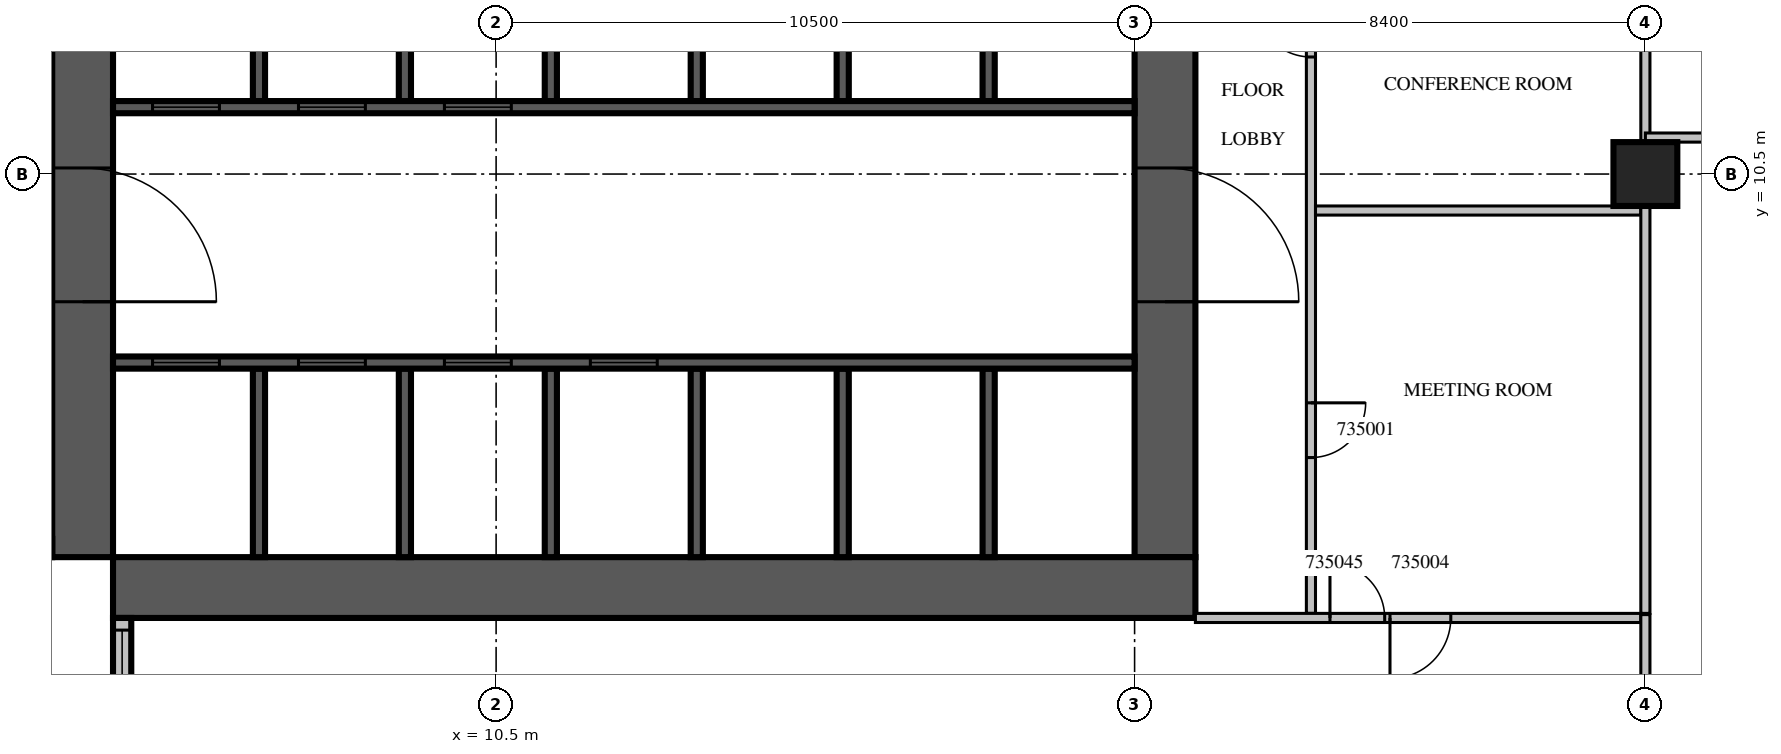
"""IFC4 building model, lengths in metres.
Left out: names, types, materials, properties, quantities, classifications, styles, units other than length and angle.
Written with IfcOpenShell. Run it as: python <this file> out.ifc"""

import sys

from ifc_helpers import new_model, si_unit, direction, frame, frame_2d, origin, origin_2d, place, context, subcontext, project, spatial, rectangle, extrude, source, transform, mapped, element, fill, save


model = new_model("IFC4")
c1 = context("Model", 3, precision=1e-05, world=origin(), true_north=direction((0.0, 1.0)))
c2 = subcontext(c1, "Body", "Model", "MODEL_VIEW")
j1 = project(units=[si_unit("LENGTHUNIT", "METRE"), si_unit("PLANEANGLEUNIT", "RADIAN")], contexts=[c1])
p1 = place(None, origin())
s1 = spatial("IfcSite", under=j1, at=p1, CompositionType="ELEMENT")
p2 = place(p1, origin())
s2 = spatial("IfcBuilding", under=s1, at=p2, CompositionType="ELEMENT")
p3 = place(p2, frame((0.0, 0.0, 158.1)))
s3 = spatial("IfcBuildingStorey", under=s2, at=p3, CompositionType="ELEMENT", Elevation=158.1)
m1 = source(origin(), c2, "Body", "SweptSolid", [
    extrude(rectangle(XDim=1.05, YDim=1.05, at=origin_2d()), origin(), (0.0, 0.0, 1.0), 4.2),
])
p4 = place(p3, frame((29.4, 10.5, 0.0), z_axis=(0.0, 0.0, 1.0), x_axis=(1.0, 0.0, 0.0)))
e1 = element("IfcColumn", 1, at=p4, inside=s3, PredefinedType="COLUMN", context=c2, shape_type="MappedRepresentation", body=[
    mapped(m1, transform((0.0, 0.0, 0.0), scale=1.0)),
])
m2 = source(origin(), c2, "Body", "SweptSolid", [
    extrude(rectangle(XDim=17.8, YDim=1.0, at=frame_2d((8.9, 0.0))), origin(), (0.0, 0.0, 1.0), 4.2),
])
p5 = place(p3, frame((3.7, 4.2, 0.0), z_axis=(0.0, 0.0, 1.0), x_axis=(0.0, 1.0, 0.0)))
e2 = element("IfcWall", 2, at=p5, inside=s3, PredefinedType="SHEAR", context=c2, shape_type="MappedRepresentation", body=[
    mapped(m2, transform((0.0, 0.0, 0.0), scale=1.0)),
])
m3 = source(origin(), c2, "Body", "SweptSolid", [
    extrude(rectangle(XDim=2.2, YDim=2.1, at=frame_2d((1.1, 1.05))), frame((0.0, 0.51, 0.0), z_axis=(0.0, -1.0, 0.0), x_axis=(1.0, 0.0, 0.0)), (0.0, 0.0, 1.0), 1.02),
])
p6 = place(p5, frame((4.2, 0.0, 0.0)))
e3 = element("IfcOpeningElement", 3, at=p6, cuts=e2, PredefinedType="OPENING", context=c2, shape_type="MappedRepresentation", body=[
    mapped(m3, transform((0.0, 0.0, 0.0), scale=1.0)),
])
m4 = source(origin(), c2, "Body", "SweptSolid", [
    extrude(rectangle(XDim=0.9, YDim=2.1, at=frame_2d((0.45, 1.05))), frame((0.0, 0.51, 0.0), z_axis=(0.0, -1.0, 0.0), x_axis=(1.0, 0.0, 0.0)), (0.0, 0.0, 1.0), 1.02),
])
p7 = place(p5, frame((10.95, 0.0, 0.0)))
e4 = element("IfcOpeningElement", 4, at=p7, cuts=e2, PredefinedType="OPENING", context=c2, shape_type="MappedRepresentation", body=[
    mapped(m4, transform((0.0, 0.0, 0.0), scale=1.0)),
])
m5 = source(origin(), c2, "Body", "SweptSolid", [
    extrude(rectangle(XDim=16.8, YDim=1.0, at=frame_2d((8.4, 0.0))), origin(), (0.0, 0.0, 1.0), 4.2),
])
p8 = place(p3, frame((21.5, 4.2, 0.0), z_axis=(0.0, 0.0, 1.0), x_axis=(0.0, 1.0, 0.0)))
e5 = element("IfcWall", 5, at=p8, inside=s3, PredefinedType="SHEAR", context=c2, shape_type="MappedRepresentation", body=[
    mapped(m5, transform((0.0, 0.0, 0.0), scale=1.0)),
])
p9 = place(p8, frame((4.2, 0.0, 0.0)))
e6 = element("IfcOpeningElement", 6, at=p9, cuts=e5, PredefinedType="OPENING", context=c2, shape_type="MappedRepresentation", body=[
    mapped(m3, transform((0.0, 0.0, 0.0), scale=1.0)),
])
m6 = source(origin(), c2, "Body", "SweptSolid", [
    extrude(rectangle(XDim=1.2, YDim=2.1, at=frame_2d((0.6, 1.05))), frame((0.0, 0.51, 0.0), z_axis=(0.0, -1.0, 0.0), x_axis=(1.0, 0.0, 0.0)), (0.0, 0.0, 1.0), 1.02),
])
p10 = place(p8, frame((14.7, 0.0, 0.0)))
e7 = element("IfcOpeningElement", 7, at=p10, cuts=e5, PredefinedType="OPENING", context=c2, shape_type="MappedRepresentation", body=[
    mapped(m6, transform((0.0, 0.0, 0.0), scale=1.0)),
])
p11 = place(p3, frame((4.2, 3.7, 0.0), z_axis=(0.0, 0.0, 1.0), x_axis=(1.0, 0.0, 0.0)))
e8 = element("IfcWall", 8, at=p11, inside=s3, PredefinedType="SHEAR", context=c2, shape_type="MappedRepresentation", body=[
    mapped(m2, transform((0.0, 0.0, 0.0), scale=1.0)),
])
m7 = source(origin(), c2, "Body", "SweptSolid", [
    extrude(rectangle(XDim=3.2, YDim=0.3, at=frame_2d((1.6, 0.0))), origin(), (0.0, 0.0, 1.0), 3.8),
])
p12 = place(p3, frame((4.35, 3.2, 0.0), z_axis=(0.0, 0.0, 1.0), x_axis=(0.0, -1.0, 0.0)))
e9 = element("IfcWall", 9, at=p12, inside=s3, PredefinedType="STANDARD", context=c2, shape_type="MappedRepresentation", body=[
    mapped(m7, transform((0.0, 0.0, 0.0), scale=1.0)),
])
m8 = source(origin(), c2, "Body", "SweptSolid", [
    extrude(rectangle(XDim=1.8, YDim=2.7, at=frame_2d((0.9, 1.35))), frame((0.0, 0.16, 0.0), z_axis=(0.0, -1.0, 0.0), x_axis=(1.0, 0.0, 0.0)), (0.0, 0.0, 1.0), 0.32),
])
p13 = place(p12, frame((0.2, 0.0, 0.6)))
e10 = element("IfcOpeningElement", 10, at=p13, cuts=e9, PredefinedType="OPENING", context=c2, shape_type="MappedRepresentation", body=[
    mapped(m8, transform((0.0, 0.0, 0.0), scale=1.0)),
])
m9 = source(origin(), c2, "Body", "SweptSolid", [
    extrude(rectangle(XDim=3.1, YDim=0.2, at=frame_2d((1.55, 0.0))), origin(), (0.0, 0.0, 1.0), 4.2),
])
for number, where, z_axis, x_axis in (
    (11, (6.6, 4.2, 0.0), (0.0, 0.0, 1.0), (0.0, 1.0, 0.0)),
    (12, (9.0, 4.2, 0.0), (0.0, 0.0, 1.0), (0.0, 1.0, 0.0)),
    (13, (11.4, 4.2, 0.0), (0.0, 0.0, 1.0), (0.0, 1.0, 0.0)),
    (14, (13.8, 4.2, 0.0), (0.0, 0.0, 1.0), (0.0, 1.0, 0.0)),
    (15, (16.2, 4.2, 0.0), (0.0, 0.0, 1.0), (0.0, 1.0, 0.0)),
    (16, (18.6, 4.2, 0.0), (0.0, 0.0, 1.0), (0.0, 1.0, 0.0)),
):
    element("IfcWall", number, at=place(p3, frame(where, z_axis=z_axis, x_axis=x_axis)), inside=s3, PredefinedType="SOLIDWALL", context=c2, shape_type="MappedRepresentation", body=[
        mapped(m9, transform((0.0, 0.0, 0.0), scale=1.0)),
    ])
m10 = source(origin(), c2, "Body", "SweptSolid", [
    extrude(rectangle(XDim=3.0, YDim=0.2, at=frame_2d((1.5, 0.0))), origin(), (0.0, 0.0, 1.0), 4.2),
])
for number, where, z_axis, x_axis in (
    (17, (6.6, 11.7, 0.0), (0.0, 0.0, 1.0), (0.0, 1.0, 0.0)),
    (18, (9.0, 11.7, 0.0), (0.0, 0.0, 1.0), (0.0, 1.0, 0.0)),
    (19, (11.4, 11.7, 0.0), (0.0, 0.0, 1.0), (0.0, 1.0, 0.0)),
    (20, (13.8, 11.7, 0.0), (0.0, 0.0, 1.0), (0.0, 1.0, 0.0)),
    (21, (16.2, 11.7, 0.0), (0.0, 0.0, 1.0), (0.0, 1.0, 0.0)),
    (22, (18.6, 11.7, 0.0), (0.0, 0.0, 1.0), (0.0, 1.0, 0.0)),
):
    element("IfcWall", number, at=place(p3, frame(where, z_axis=z_axis, x_axis=x_axis)), inside=s3, PredefinedType="SOLIDWALL", context=c2, shape_type="MappedRepresentation", body=[
        mapped(m10, transform((0.0, 0.0, 0.0), scale=1.0)),
    ])
m11 = source(origin(), c2, "Body", "SweptSolid", [
    extrude(rectangle(XDim=16.8, YDim=0.2, at=frame_2d((8.4, 0.0))), origin(), (0.0, 0.0, 1.0), 4.2),
])
p14 = place(p3, frame((4.2, 7.4, 0.0), z_axis=(0.0, 0.0, 1.0), x_axis=(1.0, 0.0, 0.0)))
e23 = element("IfcWall", 23, at=p14, inside=s3, PredefinedType="SOLIDWALL", context=c2, shape_type="MappedRepresentation", body=[
    mapped(m11, transform((0.0, 0.0, 0.0), scale=1.0)),
])
m12 = source(origin(), c2, "Body", "SweptSolid", [
    extrude(rectangle(XDim=1.1, YDim=2.1, at=frame_2d((0.55, 1.05))), frame((0.0, 0.11, 0.0), z_axis=(0.0, -1.0, 0.0), x_axis=(1.0, 0.0, 0.0)), (0.0, 0.0, 1.0), 0.22),
])
p15 = place(p14, frame((0.65, 0.0, 0.0)))
e24 = element("IfcOpeningElement", 24, at=p15, cuts=e23, PredefinedType="OPENING", context=c2, shape_type="MappedRepresentation", body=[
    mapped(m12, transform((0.0, 0.0, 0.0), scale=1.0)),
])
p16 = place(p14, frame((3.05, 0.0, 0.0)))
e25 = element("IfcOpeningElement", 25, at=p16, cuts=e23, PredefinedType="OPENING", context=c2, shape_type="MappedRepresentation", body=[
    mapped(m12, transform((0.0, 0.0, 0.0), scale=1.0)),
])
p17 = place(p14, frame((5.45, 0.0, 0.0)))
e26 = element("IfcOpeningElement", 26, at=p17, cuts=e23, PredefinedType="OPENING", context=c2, shape_type="MappedRepresentation", body=[
    mapped(m12, transform((0.0, 0.0, 0.0), scale=1.0)),
])
p18 = place(p14, frame((7.85, 0.0, 0.0)))
e27 = element("IfcOpeningElement", 27, at=p18, cuts=e23, PredefinedType="OPENING", context=c2, shape_type="MappedRepresentation", body=[
    mapped(m12, transform((0.0, 0.0, 0.0), scale=1.0)),
])
p19 = place(p3, frame((4.2, 11.6, 0.0), z_axis=(0.0, 0.0, 1.0), x_axis=(1.0, 0.0, 0.0)))
e28 = element("IfcWall", 28, at=p19, inside=s3, PredefinedType="SOLIDWALL", context=c2, shape_type="MappedRepresentation", body=[
    mapped(m11, transform((0.0, 0.0, 0.0), scale=1.0)),
])
p20 = place(p19, frame((0.65, 0.0, 0.0)))
e29 = element("IfcOpeningElement", 29, at=p20, cuts=e28, PredefinedType="OPENING", context=c2, shape_type="MappedRepresentation", body=[
    mapped(m12, transform((0.0, 0.0, 0.0), scale=1.0)),
])
p21 = place(p19, frame((3.05, 0.0, 0.0)))
e30 = element("IfcOpeningElement", 30, at=p21, cuts=e28, PredefinedType="OPENING", context=c2, shape_type="MappedRepresentation", body=[
    mapped(m12, transform((0.0, 0.0, 0.0), scale=1.0)),
])
p22 = place(p19, frame((5.45, 0.0, 0.0)))
e31 = element("IfcOpeningElement", 31, at=p22, cuts=e28, PredefinedType="OPENING", context=c2, shape_type="MappedRepresentation", body=[
    mapped(m12, transform((0.0, 0.0, 0.0), scale=1.0)),
])
m13 = source(origin(), c2, "Body", "SweptSolid", [
    extrude(rectangle(XDim=11.425, YDim=0.15, at=frame_2d((5.713, 0.0))), origin(), (0.0, 0.0, 1.0), 3.8),
])
p23 = place(p3, frame((23.9, 14.7, 0.0), z_axis=(0.0, 0.0, 1.0), x_axis=(0.0, -1.0, 0.0)))
e32 = element("IfcWall", 32, at=p23, inside=s3, PredefinedType="PARTITIONING", context=c2, shape_type="MappedRepresentation", body=[
    mapped(m13, transform((0.0, 0.0, 0.0), scale=1.0)),
])
m14 = source(origin(), c2, "Body", "SweptSolid", [
    extrude(rectangle(XDim=0.9, YDim=2.1, at=frame_2d((0.45, 1.05))), frame((0.0, 0.085, 0.0), z_axis=(0.0, -1.0, 0.0), x_axis=(1.0, 0.0, 0.0)), (0.0, 0.0, 1.0), 0.17),
])
p24 = place(p23, frame((7.963, 0.0, 0.0)))
e33 = element("IfcOpeningElement", 33, at=p24, cuts=e32, PredefinedType="OPENING", context=c2, shape_type="MappedRepresentation", body=[
    mapped(m14, transform((0.0, 0.0, 0.0), scale=1.0)),
])
p25 = place(p23, frame((1.375, 0.0, 0.0)))
e34 = element("IfcOpeningElement", 34, at=p25, cuts=e32, PredefinedType="OPENING", context=c2, shape_type="MappedRepresentation", body=[
    mapped(m14, transform((0.0, 0.0, 0.0), scale=1.0)),
])
m15 = source(origin(), c2, "Body", "SweptSolid", [
    extrude(rectangle(XDim=5.35, YDim=0.15, at=frame_2d((2.675, 0.0))), origin(), (0.0, 0.0, 1.0), 3.8),
])
p26 = place(p3, frame((29.325, 9.9, 0.0), z_axis=(0.0, 0.0, 1.0), x_axis=(-1.0, 0.0, 0.0)))
e35 = element("IfcWall", 35, at=p26, inside=s3, PredefinedType="PARTITIONING", context=c2, shape_type="MappedRepresentation", body=[
    mapped(m15, transform((0.0, 0.0, 0.0), scale=1.0)),
])
m16 = source(origin(), c2, "Body", "SweptSolid", [
    extrude(rectangle(XDim=6.701, YDim=0.15, at=frame_2d((3.35, 0.0))), origin(), (0.0, 0.0, 1.0), 3.8),
])
p27 = place(p3, frame((29.4, 3.275, 0.0), z_axis=(0.0, 0.0, 1.0), x_axis=(0.0, 1.0, 0.0)))
e36 = element("IfcWall", 36, at=p27, inside=s3, PredefinedType="PARTITIONING", context=c2, shape_type="MappedRepresentation", body=[
    mapped(m16, transform((0.0, 0.0, 0.0), scale=1.0)),
])
m17 = source(origin(), c2, "Body", "SweptSolid", [
    extrude(rectangle(XDim=3.676, YDim=0.15, at=frame_2d((1.838, 0.0))), origin(), (0.0, 0.0, 1.0), 3.8),
])
p28 = place(p3, frame((29.4, 11.024, 0.0), z_axis=(0.0, 0.0, 1.0), x_axis=(0.0, 1.0, 0.0)))
e37 = element("IfcWall", 37, at=p28, inside=s3, PredefinedType="PARTITIONING", context=c2, shape_type="MappedRepresentation", body=[
    mapped(m17, transform((0.0, 0.0, 0.0), scale=1.0)),
])
m18 = source(origin(), c2, "Body", "SweptSolid", [
    extrude(rectangle(XDim=7.325, YDim=0.15, at=frame_2d((3.663, 0.0))), origin(), (0.0, 0.0, 1.0), 3.8),
])
p29 = place(p3, frame((22.0, 3.2, 0.0), z_axis=(0.0, 0.0, 1.0), x_axis=(1.0, 0.0, 0.0)))
e38 = element("IfcWall", 38, at=p29, inside=s3, PredefinedType="PARTITIONING", context=c2, shape_type="MappedRepresentation", body=[
    mapped(m18, transform((0.0, 0.0, 0.0), scale=1.0)),
])
m19 = source(origin(), c2, "Body", "SweptSolid", [
    extrude(rectangle(XDim=1.0, YDim=2.1, at=frame_2d((0.5, 1.05))), frame((0.0, 0.085, 0.0), z_axis=(0.0, -1.0, 0.0), x_axis=(1.0, 0.0, 0.0)), (0.0, 0.0, 1.0), 0.17),
])
p30 = place(p29, frame((3.2, 0.0, 0.0)))
e39 = element("IfcOpeningElement", 39, at=p30, cuts=e38, PredefinedType="OPENING", context=c2, shape_type="MappedRepresentation", body=[
    mapped(m19, transform((0.0, 0.0, 0.0), scale=1.0)),
])
p31 = place(p29, frame((2.213, 0.0, 0.0)))
e40 = element("IfcOpeningElement", 40, at=p31, cuts=e38, PredefinedType="OPENING", context=c2, shape_type="MappedRepresentation", body=[
    mapped(m14, transform((0.0, 0.0, 0.0), scale=1.0)),
])
m20 = source(origin(), c2, "Body", "SweptSolid", [
    extrude(rectangle(XDim=2.206, YDim=0.15, at=frame_2d((1.103, 0.0))), origin(), (0.0, 0.0, 1.0), 3.8),
])
p32 = place(p3, frame((29.4, 1.049, 0.0), z_axis=(0.0, 0.0, 1.0), x_axis=(0.0, 1.0, 0.0)))
e41 = element("IfcWall", 41, at=p32, inside=s3, PredefinedType="PARTITIONING", context=c2, shape_type="MappedRepresentation", body=[
    mapped(m20, transform((0.0, 0.0, 0.0), scale=1.0)),
])
m21 = source(origin(), c2, "Body", "SweptSolid", [
    extrude(rectangle(XDim=8.4, YDim=0.15, at=frame_2d((4.2, 0.0))), origin(), (0.0, 0.0, 1.0), 3.8),
])
p33 = place(p3, frame((37.8, 11.1, 0.0), z_axis=(0.0, 0.0, 1.0), x_axis=(-1.0, 0.0, 0.0)))
e42 = element("IfcWall", 42, at=p33, inside=s3, PredefinedType="PARTITIONING", context=c2, shape_type="MappedRepresentation", body=[
    mapped(m21, transform((0.0, 0.0, 0.0), scale=1.0)),
])
m22 = source(origin(), c2, "Body", "SweptSolid", [
    extrude(rectangle(XDim=1.1, YDim=2.1, at=frame_2d((0.55, 1.05))), frame((0.0, 0.085, 0.0), z_axis=(0.0, -1.0, 0.0), x_axis=(1.0, 0.0, 0.0)), (0.0, 0.0, 1.0), 0.17),
])
p34 = place(p33, frame((5.871, 0.0, 0.0)))
e43 = element("IfcOpeningElement", 43, at=p34, cuts=e42, PredefinedType="OPENING", context=c2, shape_type="MappedRepresentation", body=[
    mapped(m22, transform((0.0, 0.0, 0.0), scale=1.0)),
])
m23 = source(origin(), c2, "Body", "SweptSolid", [
    extrude(rectangle(XDim=1.8, YDim=2.7, at=frame_2d((0.9, 1.35))), frame((0.0, 0.03, 0.0), z_axis=(0.0, -1.0, 0.0), x_axis=(1.0, 0.0, 0.0)), (0.0, 0.0, 1.0), 0.06),
])
p35 = place(p13, origin())
e44 = element("IfcWindow", 44, at=p35, inside=s3, PartitioningType="SINGLE_PANEL", PredefinedType="WINDOW", context=c2, shape_type="MappedRepresentation", body=[
    mapped(m23, transform((0.0, 0.0, 0.0), scale=1.0)),
])
fill(e10, e44)
m24 = source(origin(), c2, "Body", "SweptSolid", [
    extrude(rectangle(XDim=1.1, YDim=2.1, at=frame_2d((0.55, 1.05))), frame((0.0, 0.025, 0.0), z_axis=(0.0, -1.0, 0.0), x_axis=(1.0, 0.0, 0.0)), (0.0, 0.0, 1.0), 0.05),
])
p36 = place(p15, origin())
e45 = element("IfcDoor", 45, at=p36, inside=s3, OperationType="SLIDING_TO_LEFT", PredefinedType="DOOR", context=c2, shape_type="MappedRepresentation", body=[
    mapped(m24, transform((0.0, 0.0, 0.0), scale=1.0)),
])
fill(e24, e45)
p37 = place(p16, origin())
e46 = element("IfcDoor", 46, at=p37, inside=s3, OperationType="SLIDING_TO_LEFT", PredefinedType="DOOR", context=c2, shape_type="MappedRepresentation", body=[
    mapped(m24, transform((0.0, 0.0, 0.0), scale=1.0)),
])
fill(e25, e46)
p38 = place(p17, origin())
e47 = element("IfcDoor", 47, at=p38, inside=s3, OperationType="SLIDING_TO_LEFT", PredefinedType="DOOR", context=c2, shape_type="MappedRepresentation", body=[
    mapped(m24, transform((0.0, 0.0, 0.0), scale=1.0)),
])
fill(e26, e47)
p39 = place(p18, origin())
e48 = element("IfcDoor", 48, at=p39, inside=s3, OperationType="SLIDING_TO_LEFT", PredefinedType="DOOR", context=c2, shape_type="MappedRepresentation", body=[
    mapped(m24, transform((0.0, 0.0, 0.0), scale=1.0)),
])
fill(e27, e48)
p40 = place(p20, origin())
e49 = element("IfcDoor", 49, at=p40, inside=s3, OperationType="SLIDING_TO_LEFT", PredefinedType="DOOR", context=c2, shape_type="MappedRepresentation", body=[
    mapped(m24, transform((0.0, 0.0, 0.0), scale=1.0)),
])
fill(e29, e49)
p41 = place(p21, origin())
e50 = element("IfcDoor", 50, at=p41, inside=s3, OperationType="SLIDING_TO_LEFT", PredefinedType="DOOR", context=c2, shape_type="MappedRepresentation", body=[
    mapped(m24, transform((0.0, 0.0, 0.0), scale=1.0)),
])
fill(e30, e50)
p42 = place(p22, origin())
e51 = element("IfcDoor", 51, at=p42, inside=s3, OperationType="SLIDING_TO_LEFT", PredefinedType="DOOR", context=c2, shape_type="MappedRepresentation", body=[
    mapped(m24, transform((0.0, 0.0, 0.0), scale=1.0)),
])
fill(e31, e51)
m25 = source(origin(), c2, "Body", "SweptSolid", [
    extrude(rectangle(XDim=2.2, YDim=2.1, at=frame_2d((1.1, 1.05))), frame((0.0, 0.025, 0.0), z_axis=(0.0, -1.0, 0.0), x_axis=(1.0, 0.0, 0.0)), (0.0, 0.0, 1.0), 0.05),
])
p43 = place(p9, origin())
e52 = element("IfcDoor", 52, at=p43, inside=s3, OperationType="DOUBLE_DOOR_SINGLE_SWING", PredefinedType="DOOR", context=c2, shape_type="MappedRepresentation", body=[
    mapped(m25, transform((0.0, 0.0, 0.0), scale=1.0)),
])
fill(e6, e52)
p44 = place(p6, origin())
e53 = element("IfcDoor", 53, at=p44, inside=s3, OperationType="DOUBLE_DOOR_SINGLE_SWING", PredefinedType="DOOR", context=c2, shape_type="MappedRepresentation", body=[
    mapped(m25, transform((0.0, 0.0, 0.0), scale=1.0)),
])
fill(e3, e53)
m26 = source(origin(), c2, "Body", "SweptSolid", [
    extrude(rectangle(XDim=0.9, YDim=2.1, at=frame_2d((0.45, 1.05))), frame((0.0, 0.025, 0.0), z_axis=(0.0, -1.0, 0.0), x_axis=(1.0, 0.0, 0.0)), (0.0, 0.0, 1.0), 0.05),
])
p45 = place(p24, origin())
e54 = element("IfcDoor", 54, at=p45, inside=s3, OperationType="SINGLE_SWING_LEFT", PredefinedType="DOOR", context=c2, shape_type="MappedRepresentation", body=[
    mapped(m26, transform((0.0, 0.0, 0.0), scale=1.0)),
])
fill(e33, e54)
p46 = place(p25, origin())
e55 = element("IfcDoor", 55, at=p46, inside=s3, OperationType="SINGLE_SWING_RIGHT", PredefinedType="DOOR", context=c2, shape_type="MappedRepresentation", body=[
    mapped(m26, transform((0.0, 0.0, 0.0), scale=1.0)),
])
fill(e34, e55)
m27 = source(origin(), c2, "Body", "SweptSolid", [
    extrude(rectangle(XDim=1.0, YDim=2.1, at=frame_2d((0.5, 1.05))), frame((0.0, 0.025, 0.0), z_axis=(0.0, -1.0, 0.0), x_axis=(1.0, 0.0, 0.0)), (0.0, 0.0, 1.0), 0.05),
])
p47 = place(p30, origin())
e56 = element("IfcDoor", 56, at=p47, inside=s3, OperationType="SINGLE_SWING_RIGHT", PredefinedType="DOOR", context=c2, shape_type="MappedRepresentation", body=[
    mapped(m27, transform((0.0, 0.0, 0.0), scale=1.0)),
])
fill(e39, e56)
p48 = place(p31, origin())
e57 = element("IfcDoor", 57, at=p48, inside=s3, OperationType="SINGLE_SWING_LEFT", PredefinedType="DOOR", context=c2, shape_type="MappedRepresentation", body=[
    mapped(m26, transform((0.0, 0.0, 0.0), scale=1.0)),
])
fill(e40, e57)
save(model, sys.argv[1])
